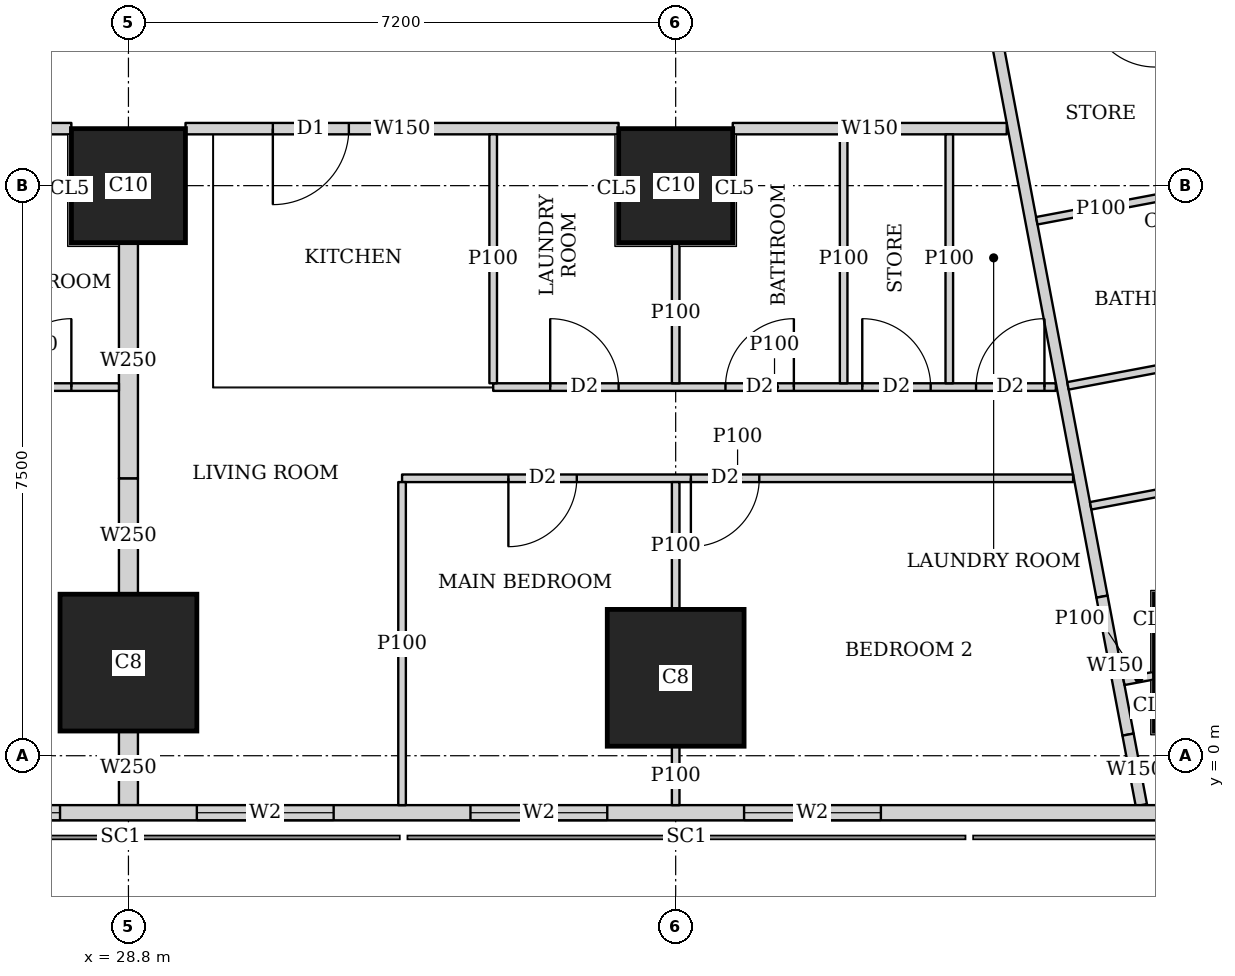
"""IFC4 building model, lengths in metres.
Left out: names, types, materials, properties, quantities, classifications, styles, units other than length and angle.
Written with IfcOpenShell. Run it as: python <this file> out.ifc"""

import sys

from ifc_helpers import new_model, si_unit, direction, frame, frame_2d, origin, origin_2d, place, context, subcontext, project, spatial, rectangle, extrude, element, fill, save


model = new_model("IFC4")
c1 = context("Model", 3, precision=1e-05, world=origin(), true_north=direction((0.0, 1.0)))
c2 = subcontext(c1, "Body", "Model", "MODEL_VIEW")
j1 = project(units=[si_unit("LENGTHUNIT", "METRE"), si_unit("PLANEANGLEUNIT", "RADIAN")], contexts=[c1])
p1 = place(None, origin())
s1 = spatial("IfcSite", under=j1, at=p1, CompositionType="ELEMENT")
p2 = place(p1, origin())
s2 = spatial("IfcBuilding", under=s1, at=p2, CompositionType="ELEMENT")
p3 = place(p2, frame((0.0, 0.0, 169.55)))
s3 = spatial("IfcBuildingStorey", under=s2, at=p3, CompositionType="ELEMENT", Elevation=169.55)
for number, where, z_axis, x_axis in (
    (1, (28.8, 1.225, 0.0), (0.0, 0.0, 1.0), (1.0, 0.0, 0.0)),
    (2, (36.0, 1.025, 0.0), (0.0, 0.0, 1.0), (1.0, 0.0, 0.0)),
    (3, (43.2, 1.225, 0.0), (0.0, 0.0, 1.0), (1.0, 0.0, 0.0)),
):
    element("IfcColumn", number, at=place(p3, frame(where, z_axis=z_axis, x_axis=x_axis)), inside=s3, PredefinedType="COLUMN", context=c2, shape_type="SweptSolid", body=[
        extrude(rectangle(XDim=1.8, YDim=1.8, at=origin_2d()), origin(), (0.0, 0.0, 1.0), 3.75),
    ])
for number, where, z_axis, x_axis in (
    (4, (28.8, 7.5, 0.0), (0.0, 0.0, 1.0), (1.0, 0.0, 0.0)),
    (5, (36.0, 7.5, 0.0), (0.0, 0.0, 1.0), (1.0, 0.0, 0.0)),
):
    element("IfcColumn", number, at=place(p3, frame(where, z_axis=z_axis, x_axis=x_axis)), inside=s3, PredefinedType="COLUMN", context=c2, shape_type="SweptSolid", body=[
        extrude(rectangle(XDim=1.5, YDim=1.5, at=origin_2d()), origin(), (0.0, 0.0, 1.0), 3.75),
    ])
p4 = place(p3, frame((2.163, -0.75, 0.0), z_axis=(0.0, 0.0, 1.0), x_axis=(1.0, 0.0, 0.0)))
e6 = element("IfcWall", 6, at=p4, inside=s3, PredefinedType="SOLIDWALL", context=c2, shape_type="SweptSolid", body=[
    extrude(rectangle(XDim=45.628, YDim=0.2, at=frame_2d((22.814, 0.0))), origin(), (0.0, 0.0, 1.0), 3.5),
])
p5 = place(p4, frame((9.537, 0.0, 0.9)))
e7 = element("IfcOpeningElement", 7, at=p5, cuts=e6, PredefinedType="OPENING", context=c2, shape_type="SweptSolid", body=[
    extrude(rectangle(XDim=1.8, YDim=1.5, at=frame_2d((0.9, 0.75))), frame((0.0, 0.11, 0.0), z_axis=(0.0, -1.0, 0.0), x_axis=(1.0, 0.0, 0.0)), (0.0, 0.0, 1.0), 0.22),
])
p6 = place(p4, frame((13.137, 0.0, 0.9)))
e8 = element("IfcOpeningElement", 8, at=p6, cuts=e6, PredefinedType="OPENING", context=c2, shape_type="SweptSolid", body=[
    extrude(rectangle(XDim=1.8, YDim=1.5, at=frame_2d((0.9, 0.75))), frame((0.0, 0.11, 0.0), z_axis=(0.0, -1.0, 0.0), x_axis=(1.0, 0.0, 0.0)), (0.0, 0.0, 1.0), 0.22),
])
p7 = place(p4, frame((16.737, 0.0, 0.9)))
e9 = element("IfcOpeningElement", 9, at=p7, cuts=e6, PredefinedType="OPENING", context=c2, shape_type="SweptSolid", body=[
    extrude(rectangle(XDim=1.8, YDim=1.5, at=frame_2d((0.9, 0.75))), frame((0.0, 0.11, 0.0), z_axis=(0.0, -1.0, 0.0), x_axis=(1.0, 0.0, 0.0)), (0.0, 0.0, 1.0), 0.22),
])
p8 = place(p4, frame((20.337, 0.0, 0.9)))
e10 = element("IfcOpeningElement", 10, at=p8, cuts=e6, PredefinedType="OPENING", context=c2, shape_type="SweptSolid", body=[
    extrude(rectangle(XDim=1.8, YDim=1.5, at=frame_2d((0.9, 0.75))), frame((0.0, 0.11, 0.0), z_axis=(0.0, -1.0, 0.0), x_axis=(1.0, 0.0, 0.0)), (0.0, 0.0, 1.0), 0.22),
])
p9 = place(p4, frame((23.937, 0.0, 0.9)))
e11 = element("IfcOpeningElement", 11, at=p9, cuts=e6, PredefinedType="OPENING", context=c2, shape_type="SweptSolid", body=[
    extrude(rectangle(XDim=1.8, YDim=1.5, at=frame_2d((0.9, 0.75))), frame((0.0, 0.11, 0.0), z_axis=(0.0, -1.0, 0.0), x_axis=(1.0, 0.0, 0.0)), (0.0, 0.0, 1.0), 0.22),
])
p10 = place(p4, frame((27.537, 0.0, 0.9)))
e12 = element("IfcOpeningElement", 12, at=p10, cuts=e6, PredefinedType="OPENING", context=c2, shape_type="SweptSolid", body=[
    extrude(rectangle(XDim=1.8, YDim=1.5, at=frame_2d((0.9, 0.75))), frame((0.0, 0.11, 0.0), z_axis=(0.0, -1.0, 0.0), x_axis=(1.0, 0.0, 0.0)), (0.0, 0.0, 1.0), 0.22),
])
p11 = place(p4, frame((31.137, 0.0, 0.9)))
e13 = element("IfcOpeningElement", 13, at=p11, cuts=e6, PredefinedType="OPENING", context=c2, shape_type="SweptSolid", body=[
    extrude(rectangle(XDim=1.8, YDim=1.5, at=frame_2d((0.9, 0.75))), frame((0.0, 0.11, 0.0), z_axis=(0.0, -1.0, 0.0), x_axis=(1.0, 0.0, 0.0)), (0.0, 0.0, 1.0), 0.22),
])
p12 = place(p4, frame((34.737, 0.0, 0.9)))
e14 = element("IfcOpeningElement", 14, at=p12, cuts=e6, PredefinedType="OPENING", context=c2, shape_type="SweptSolid", body=[
    extrude(rectangle(XDim=1.8, YDim=1.5, at=frame_2d((0.9, 0.75))), frame((0.0, 0.11, 0.0), z_axis=(0.0, -1.0, 0.0), x_axis=(1.0, 0.0, 0.0)), (0.0, 0.0, 1.0), 0.22),
])
p13 = place(p3, frame((40.356, 8.25, 0.0), z_axis=(0.0, 0.0, 1.0), x_axis=(-1.0, 0.0, 0.0)))
e15 = element("IfcWall", 15, at=p13, inside=s3, PredefinedType="SOLIDWALL", context=c2, shape_type="SweptSolid", body=[
    extrude(rectangle(XDim=3.605, YDim=0.15, at=frame_2d((1.802, 0.0))), origin(), (0.0, 0.0, 1.0), 3.5),
])
p14 = place(p3, frame((35.249, 8.25, 0.0), z_axis=(0.0, 0.0, 1.0), x_axis=(-1.0, 0.0, 0.0)))
e16 = element("IfcWall", 16, at=p14, inside=s3, PredefinedType="SOLIDWALL", context=c2, shape_type="SweptSolid", body=[
    extrude(rectangle(XDim=5.698, YDim=0.15, at=frame_2d((2.849, 0.0))), origin(), (0.0, 0.0, 1.0), 3.5),
])
p15 = place(p14, frame((3.549, 0.0, 0.0)))
e17 = element("IfcOpeningElement", 17, at=p15, cuts=e16, PredefinedType="OPENING", context=c2, shape_type="SweptSolid", body=[
    extrude(rectangle(XDim=1.0, YDim=2.1, at=frame_2d((0.5, 1.05))), frame((0.0, 0.085, 0.0), z_axis=(0.0, -1.0, 0.0), x_axis=(1.0, 0.0, 0.0)), (0.0, 0.0, 1.0), 0.17),
])
p16 = place(p3, frame((28.049, 8.25, 0.0), z_axis=(0.0, 0.0, 1.0), x_axis=(-1.0, 0.0, 0.0)))
e18 = element("IfcWall", 18, at=p16, inside=s3, PredefinedType="SOLIDWALL", context=c2, shape_type="SweptSolid", body=[
    extrude(rectangle(XDim=5.698, YDim=0.15, at=frame_2d((2.849, 0.0))), origin(), (0.0, 0.0, 1.0), 3.5),
])
p17 = place(p16, frame((3.549, 0.0, 0.0)))
e19 = element("IfcOpeningElement", 19, at=p17, cuts=e18, PredefinedType="OPENING", context=c2, shape_type="SweptSolid", body=[
    extrude(rectangle(XDim=1.0, YDim=2.1, at=frame_2d((0.5, 1.05))), frame((0.0, 0.085, 0.0), z_axis=(0.0, -1.0, 0.0), x_axis=(1.0, 0.0, 0.0)), (0.0, 0.0, 1.0), 0.17),
])
p18 = place(p3, frame((33.877, 43.029, 0.0), z_axis=(0.0, 0.0, 1.0), x_axis=(0.185596841028, -0.98262597798, 0.0)))
e20 = element("IfcWall", 20, at=p18, inside=s3, PredefinedType="SOLIDWALL", context=c2, shape_type="SweptSolid", body=[
    extrude(rectangle(XDim=41.66, YDim=0.15, at=frame_2d((20.83, 0.0))), origin(), (0.0, 0.0, 1.0), 2.5),
])
p19 = place(p18, frame((8.63, 0.0, 0.0)))
e21 = element("IfcOpeningElement", 21, at=p19, cuts=e20, PredefinedType="OPENING", context=c2, shape_type="SweptSolid", body=[
    extrude(rectangle(XDim=1.0, YDim=2.1, at=frame_2d((0.5, 1.05))), frame((0.0, 0.085, 0.0), z_axis=(0.0, -1.0, 0.0), x_axis=(1.0, 0.0, 0.0)), (0.0, 0.0, 1.0), 0.17),
])
p20 = place(p18, frame((13.841, 0.0, 0.0)))
e22 = element("IfcOpeningElement", 22, at=p20, cuts=e20, PredefinedType="OPENING", context=c2, shape_type="SweptSolid", body=[
    extrude(rectangle(XDim=1.0, YDim=2.1, at=frame_2d((0.5, 1.05))), frame((0.0, 0.085, 0.0), z_axis=(0.0, -1.0, 0.0), x_axis=(1.0, 0.0, 0.0)), (0.0, 0.0, 1.0), 0.17),
])
p21 = place(p18, frame((21.474, 0.0, 0.0)))
e23 = element("IfcOpeningElement", 23, at=p21, cuts=e20, PredefinedType="OPENING", context=c2, shape_type="SweptSolid", body=[
    extrude(rectangle(XDim=1.0, YDim=2.1, at=frame_2d((0.5, 1.05))), frame((0.0, 0.085, 0.0), z_axis=(0.0, -1.0, 0.0), x_axis=(1.0, 0.0, 0.0)), (0.0, 0.0, 1.0), 0.17),
])
p22 = place(p18, frame((30.4, 0.0, 0.0)))
e24 = element("IfcOpeningElement", 24, at=p22, cuts=e20, PredefinedType="OPENING", context=c2, shape_type="SweptSolid", body=[
    extrude(rectangle(XDim=1.0, YDim=2.1, at=frame_2d((0.5, 1.05))), frame((0.0, 0.085, 0.0), z_axis=(0.0, -1.0, 0.0), x_axis=(1.0, 0.0, 0.0)), (0.0, 0.0, 1.0), 0.17),
])
p23 = place(p18, frame((32.288, 0.0, 0.0)))
e25 = element("IfcOpeningElement", 25, at=p23, cuts=e20, PredefinedType="OPENING", context=c2, shape_type="SweptSolid", body=[
    extrude(rectangle(XDim=1.0, YDim=2.1, at=frame_2d((0.5, 1.05))), frame((0.0, 0.085, 0.0), z_axis=(0.0, -1.0, 0.0), x_axis=(1.0, 0.0, 0.0)), (0.0, 0.0, 1.0), 0.17),
])
p24 = place(p3, frame((41.609, 2.093, 0.0), z_axis=(0.0, 0.0, 1.0), x_axis=(0.185708872674, -0.982604811005, 0.0)))
e26 = element("IfcWall", 26, at=p24, inside=s3, PredefinedType="SOLIDWALL", context=c2, shape_type="SweptSolid", body=[
    extrude(rectangle(XDim=1.847, YDim=0.15, at=frame_2d((0.924, 0.0))), origin(), (0.0, 0.0, 1.0), 2.1),
])
p25 = place(p3, frame((41.952, 0.278, 0.0), z_axis=(0.0, 0.0, 1.0), x_axis=(0.185365466984, -0.982669651332, 0.0)))
e27 = element("IfcWall", 27, at=p25, inside=s3, PredefinedType="SOLIDWALL", context=c2, shape_type="SweptSolid", body=[
    extrude(rectangle(XDim=0.944, YDim=0.15, at=frame_2d((0.472, 0.0))), origin(), (0.0, 0.0, 1.0), 3.5),
])
p26 = place(p3, frame((28.675, 4.85, 0.0), z_axis=(0.0, 0.0, 1.0), x_axis=(-1.0, 0.0, 0.0)))
e28 = element("IfcWall", 28, at=p26, inside=s3, PredefinedType="PARTITIONING", context=c2, shape_type="SweptSolid", body=[
    extrude(rectangle(XDim=2.276, YDim=0.1, at=frame_2d((1.138, 0.0))), origin(), (0.0, 0.0, 1.0), 3.5),
])
p27 = place(p26, frame((0.626, 0.0, 0.0)))
e29 = element("IfcOpeningElement", 29, at=p27, cuts=e28, PredefinedType="OPENING", context=c2, shape_type="SweptSolid", body=[
    extrude(rectangle(XDim=0.9, YDim=2.1, at=frame_2d((0.45, 1.05))), frame((0.0, 0.06, 0.0), z_axis=(0.0, -1.0, 0.0), x_axis=(1.0, 0.0, 0.0)), (0.0, 0.0, 1.0), 0.12),
])
p28 = place(p3, frame((41.229, 3.65, 0.0), z_axis=(0.0, 0.0, 1.0), x_axis=(-1.0, 0.0, 0.0)))
e30 = element("IfcWall", 30, at=p28, inside=s3, PredefinedType="PARTITIONING", context=c2, shape_type="SweptSolid", body=[
    extrude(rectangle(XDim=8.829, YDim=0.1, at=frame_2d((4.415, 0.0))), origin(), (0.0, 0.0, 1.0), 3.5),
])
p29 = place(p28, frame((6.53, 0.0, 0.0)))
e31 = element("IfcOpeningElement", 31, at=p29, cuts=e30, PredefinedType="OPENING", context=c2, shape_type="SweptSolid", body=[
    extrude(rectangle(XDim=0.9, YDim=2.1, at=frame_2d((0.45, 1.05))), frame((0.0, 0.06, 0.0), z_axis=(0.0, -1.0, 0.0), x_axis=(1.0, 0.0, 0.0)), (0.0, 0.0, 1.0), 0.12),
])
p30 = place(p28, frame((4.129, 0.0, 0.0)))
e32 = element("IfcOpeningElement", 32, at=p30, cuts=e30, PredefinedType="OPENING", context=c2, shape_type="SweptSolid", body=[
    extrude(rectangle(XDim=0.9, YDim=2.1, at=frame_2d((0.45, 1.05))), frame((0.0, 0.06, 0.0), z_axis=(0.0, -1.0, 0.0), x_axis=(1.0, 0.0, 0.0)), (0.0, 0.0, 1.0), 0.12),
])
p31 = place(p3, frame((41.002, 4.85, 0.0), z_axis=(0.0, 0.0, 1.0), x_axis=(-1.0, 0.0, 0.0)))
e33 = element("IfcWall", 33, at=p31, inside=s3, PredefinedType="PARTITIONING", context=c2, shape_type="SweptSolid", body=[
    extrude(rectangle(XDim=7.403, YDim=0.1, at=frame_2d((3.701, 0.0))), origin(), (0.0, 0.0, 1.0), 3.5),
])
p32 = place(p31, frame((5.753, 0.0, 0.0)))
e34 = element("IfcOpeningElement", 34, at=p32, cuts=e33, PredefinedType="OPENING", context=c2, shape_type="SweptSolid", body=[
    extrude(rectangle(XDim=0.9, YDim=2.1, at=frame_2d((0.45, 1.05))), frame((0.0, 0.06, 0.0), z_axis=(0.0, -1.0, 0.0), x_axis=(1.0, 0.0, 0.0)), (0.0, 0.0, 1.0), 0.12),
])
p33 = place(p31, frame((3.447, 0.0, 0.0)))
e35 = element("IfcOpeningElement", 35, at=p33, cuts=e33, PredefinedType="OPENING", context=c2, shape_type="SweptSolid", body=[
    extrude(rectangle(XDim=0.9, YDim=2.1, at=frame_2d((0.45, 1.05))), frame((0.0, 0.06, 0.0), z_axis=(0.0, -1.0, 0.0), x_axis=(1.0, 0.0, 0.0)), (0.0, 0.0, 1.0), 0.12),
])
p34 = place(p31, frame((0.15, 0.0, 0.0)))
e36 = element("IfcOpeningElement", 36, at=p34, cuts=e33, PredefinedType="OPENING", context=c2, shape_type="SweptSolid", body=[
    extrude(rectangle(XDim=0.9, YDim=2.1, at=frame_2d((0.45, 1.05))), frame((0.0, 0.06, 0.0), z_axis=(0.0, -1.0, 0.0), x_axis=(1.0, 0.0, 0.0)), (0.0, 0.0, 1.0), 0.12),
])
p35 = place(p31, frame((1.647, 0.0, 0.0)))
e37 = element("IfcOpeningElement", 37, at=p35, cuts=e33, PredefinedType="OPENING", context=c2, shape_type="SweptSolid", body=[
    extrude(rectangle(XDim=0.9, YDim=2.1, at=frame_2d((0.45, 1.05))), frame((0.0, 0.06, 0.0), z_axis=(0.0, -1.0, 0.0), x_axis=(1.0, 0.0, 0.0)), (0.0, 0.0, 1.0), 0.12),
])
p36 = place(p3, frame((32.4, -0.65, 0.0), z_axis=(0.0, 0.0, 1.0), x_axis=(0.0, 1.0, 0.0)))
e38 = element("IfcWall", 38, at=p36, inside=s3, PredefinedType="PARTITIONING", context=c2, shape_type="SweptSolid", body=[
    extrude(rectangle(XDim=4.25, YDim=0.1, at=frame_2d((2.125, 0.0))), origin(), (0.0, 0.0, 1.0), 2.1),
])
p37 = place(p3, frame((36.0, -0.65, 0.0), z_axis=(0.0, 0.0, 1.0), x_axis=(0.0, 1.0, 0.0)))
e39 = element("IfcWall", 39, at=p37, inside=s3, PredefinedType="PARTITIONING", context=c2, shape_type="SweptSolid", body=[
    extrude(rectangle(XDim=0.774, YDim=0.1, at=frame_2d((0.387, 0.0))), origin(), (0.0, 0.0, 1.0), 3.5),
])
p38 = place(p3, frame((36.0, 1.926, 0.0), z_axis=(0.0, 0.0, 1.0), x_axis=(0.0, 1.0, 0.0)))
e40 = element("IfcWall", 40, at=p38, inside=s3, PredefinedType="PARTITIONING", context=c2, shape_type="SweptSolid", body=[
    extrude(rectangle(XDim=1.674, YDim=0.1, at=frame_2d((0.837, 0.0))), origin(), (0.0, 0.0, 1.0), 3.5),
])
p39 = place(p3, frame((33.599, 4.9, 0.0), z_axis=(0.0, 0.0, 1.0), x_axis=(0.0, 1.0, 0.0)))
e41 = element("IfcWall", 41, at=p39, inside=s3, PredefinedType="PARTITIONING", context=c2, shape_type="SweptSolid", body=[
    extrude(rectangle(XDim=3.275, YDim=0.1, at=frame_2d((1.638, 0.0))), origin(), (0.0, 0.0, 1.0), 3.5),
])
p40 = place(p3, frame((36.0, 4.9, 0.0), z_axis=(0.0, 0.0, 1.0), x_axis=(0.0, 1.0, 0.0)))
e42 = element("IfcWall", 42, at=p40, inside=s3, PredefinedType="PARTITIONING", context=c2, shape_type="SweptSolid", body=[
    extrude(rectangle(XDim=1.849, YDim=0.1, at=frame_2d((0.925, 0.0))), origin(), (0.0, 0.0, 1.0), 3.5),
])
for number, where, z_axis, x_axis in (
    (43, (39.6, 4.9, 0.0), (0.0, 0.0, 1.0), (0.0, 1.0, 0.0)),
    (44, (38.21, 4.9, 0.0), (0.0, 0.0, 1.0), (0.0, 1.0, 0.0)),
):
    element("IfcWall", number, at=place(p3, frame(where, z_axis=z_axis, x_axis=x_axis)), inside=s3, PredefinedType="PARTITIONING", context=c2, shape_type="SweptSolid", body=[
        extrude(rectangle(XDim=3.275, YDim=0.1, at=frame_2d((1.638, 0.0))), origin(), (0.0, 0.0, 1.0), 3.5),
    ])
p41 = place(p3, frame((28.8, -0.65, 0.0), z_axis=(0.0, 0.0, 1.0), x_axis=(0.0, 1.0, 0.0)))
e45 = element("IfcWall", 45, at=p41, inside=s3, PredefinedType="SOLIDWALL", context=c2, shape_type="SweptSolid", body=[
    extrude(rectangle(XDim=0.974, YDim=0.25, at=frame_2d((0.487, 0.0))), origin(), (0.0, 0.0, 1.0), 2.1),
])
p42 = place(p3, frame((28.8, 2.126, 0.0), z_axis=(0.0, 0.0, 1.0), x_axis=(0.0, 1.0, 0.0)))
e46 = element("IfcWall", 46, at=p42, inside=s3, PredefinedType="SOLIDWALL", context=c2, shape_type="SweptSolid", body=[
    extrude(rectangle(XDim=1.524, YDim=0.25, at=frame_2d((0.762, 0.0))), origin(), (0.0, 0.0, 1.0), 2.1),
])
p43 = place(p3, frame((28.8, 3.65, 0.0), z_axis=(0.0, 0.0, 1.0), x_axis=(0.0, 1.0, 0.0)))
e47 = element("IfcWall", 47, at=p43, inside=s3, PredefinedType="SOLIDWALL", context=c2, shape_type="SweptSolid", body=[
    extrude(rectangle(XDim=3.099, YDim=0.25, at=frame_2d((1.55, 0.0))), origin(), (0.0, 0.0, 1.0), 3.5),
])
p44 = place(p3, frame((42.44, 7.357, 0.0), z_axis=(0.0, 0.0, 1.0), x_axis=(-0.982643094077, -0.185506198448, 0.0)))
e48 = element("IfcWall", 48, at=p44, inside=s3, PredefinedType="PARTITIONING", context=c2, shape_type="SweptSolid", body=[
    extrude(rectangle(XDim=1.719, YDim=0.1, at=frame_2d((0.859, 0.0))), origin(), (0.0, 0.0, 1.0), 3.5),
])
p45 = place(p3, frame((42.29, 1.053, 0.0), z_axis=(0.0, 0.0, 1.0), x_axis=(-0.982830800147, -0.184509127909, 0.0)))
e49 = element("IfcWall", 49, at=p45, inside=s3, PredefinedType="PARTITIONING", context=c2, shape_type="SweptSolid", body=[
    extrude(rectangle(XDim=0.401, YDim=0.1, at=frame_2d((0.2, 0.0))), origin(), (0.0, 0.0, 1.0), 2.1),
])
p46 = place(p3, frame((44.677, 3.896, 0.0), z_axis=(0.0, 0.0, 1.0), x_axis=(-0.982610347627, -0.185679575441, 0.0)))
e50 = element("IfcWall", 50, at=p46, inside=s3, PredefinedType="PARTITIONING", context=c2, shape_type="SweptSolid", body=[
    extrude(rectangle(XDim=3.274, YDim=0.1, at=frame_2d((1.637, 0.0))), origin(), (0.0, 0.0, 1.0), 3.5),
])
p47 = place(p3, frame((44.379, 5.474, 0.0), z_axis=(0.0, 0.0, 1.0), x_axis=(-0.982607026909, -0.185697147715, 0.0)))
e51 = element("IfcWall", 51, at=p47, inside=s3, PredefinedType="PARTITIONING", context=c2, shape_type="SweptSolid", body=[
    extrude(rectangle(XDim=3.275, YDim=0.1, at=frame_2d((1.637, 0.0))), origin(), (0.0, 0.0, 1.0), 3.5),
])
p48 = place(p9, origin())
e52 = element("IfcWindow", 52, at=p48, inside=s3, PartitioningType="SINGLE_PANEL", PredefinedType="WINDOW", context=c2, shape_type="SweptSolid", body=[
    extrude(rectangle(XDim=1.8, YDim=1.5, at=frame_2d((0.9, 0.75))), frame((0.0, 0.03, 0.0), z_axis=(0.0, -1.0, 0.0), x_axis=(1.0, 0.0, 0.0)), (0.0, 0.0, 1.0), 0.06),
])
fill(e11, e52)
p49 = place(p10, origin())
e53 = element("IfcWindow", 53, at=p49, inside=s3, PartitioningType="SINGLE_PANEL", PredefinedType="WINDOW", context=c2, shape_type="SweptSolid", body=[
    extrude(rectangle(XDim=1.8, YDim=1.5, at=frame_2d((0.9, 0.75))), frame((0.0, 0.03, 0.0), z_axis=(0.0, -1.0, 0.0), x_axis=(1.0, 0.0, 0.0)), (0.0, 0.0, 1.0), 0.06),
])
fill(e12, e53)
p50 = place(p11, origin())
e54 = element("IfcWindow", 54, at=p50, inside=s3, PartitioningType="SINGLE_PANEL", PredefinedType="WINDOW", context=c2, shape_type="SweptSolid", body=[
    extrude(rectangle(XDim=1.8, YDim=1.5, at=frame_2d((0.9, 0.75))), frame((0.0, 0.03, 0.0), z_axis=(0.0, -1.0, 0.0), x_axis=(1.0, 0.0, 0.0)), (0.0, 0.0, 1.0), 0.06),
])
fill(e13, e54)
p51 = place(p12, origin())
e55 = element("IfcWindow", 55, at=p51, inside=s3, PartitioningType="SINGLE_PANEL", PredefinedType="WINDOW", context=c2, shape_type="SweptSolid", body=[
    extrude(rectangle(XDim=1.8, YDim=1.5, at=frame_2d((0.9, 0.75))), frame((0.0, 0.03, 0.0), z_axis=(0.0, -1.0, 0.0), x_axis=(1.0, 0.0, 0.0)), (0.0, 0.0, 1.0), 0.06),
])
fill(e14, e55)
p52 = place(p27, origin())
e56 = element("IfcDoor", 56, at=p52, inside=s3, OperationType="SINGLE_SWING_RIGHT", PredefinedType="DOOR", context=c2, shape_type="SweptSolid", body=[
    extrude(rectangle(XDim=0.9, YDim=2.1, at=frame_2d((0.45, 1.05))), frame((0.0, 0.025, 0.0), z_axis=(0.0, -1.0, 0.0), x_axis=(1.0, 0.0, 0.0)), (0.0, 0.0, 1.0), 0.05),
])
fill(e29, e56)
p53 = place(p29, origin())
e57 = element("IfcDoor", 57, at=p53, inside=s3, OperationType="SINGLE_SWING_RIGHT", PredefinedType="DOOR", context=c2, shape_type="SweptSolid", body=[
    extrude(rectangle(XDim=0.9, YDim=2.1, at=frame_2d((0.45, 1.05))), frame((0.0, 0.025, 0.0), z_axis=(0.0, -1.0, 0.0), x_axis=(1.0, 0.0, 0.0)), (0.0, 0.0, 1.0), 0.05),
])
fill(e31, e57)
p54 = place(p30, origin())
e58 = element("IfcDoor", 58, at=p54, inside=s3, OperationType="SINGLE_SWING_RIGHT", PredefinedType="DOOR", context=c2, shape_type="SweptSolid", body=[
    extrude(rectangle(XDim=0.9, YDim=2.1, at=frame_2d((0.45, 1.05))), frame((0.0, 0.025, 0.0), z_axis=(0.0, -1.0, 0.0), x_axis=(1.0, 0.0, 0.0)), (0.0, 0.0, 1.0), 0.05),
])
fill(e32, e58)
p55 = place(p32, origin())
e59 = element("IfcDoor", 59, at=p55, inside=s3, OperationType="SINGLE_SWING_LEFT", PredefinedType="DOOR", context=c2, shape_type="SweptSolid", body=[
    extrude(rectangle(XDim=0.9, YDim=2.1, at=frame_2d((0.45, 1.05))), frame((0.0, 0.025, 0.0), z_axis=(0.0, -1.0, 0.0), x_axis=(1.0, 0.0, 0.0)), (0.0, 0.0, 1.0), 0.05),
])
fill(e34, e59)
p56 = place(p33, origin())
e60 = element("IfcDoor", 60, at=p56, inside=s3, OperationType="SINGLE_SWING_RIGHT", PredefinedType="DOOR", context=c2, shape_type="SweptSolid", body=[
    extrude(rectangle(XDim=0.9, YDim=2.1, at=frame_2d((0.45, 1.05))), frame((0.0, 0.025, 0.0), z_axis=(0.0, -1.0, 0.0), x_axis=(1.0, 0.0, 0.0)), (0.0, 0.0, 1.0), 0.05),
])
fill(e35, e60)
p57 = place(p34, origin())
e61 = element("IfcDoor", 61, at=p57, inside=s3, OperationType="SINGLE_SWING_RIGHT", PredefinedType="DOOR", context=c2, shape_type="SweptSolid", body=[
    extrude(rectangle(XDim=0.9, YDim=2.1, at=frame_2d((0.45, 1.05))), frame((0.0, 0.025, 0.0), z_axis=(0.0, -1.0, 0.0), x_axis=(1.0, 0.0, 0.0)), (0.0, 0.0, 1.0), 0.05),
])
fill(e36, e61)
p58 = place(p35, origin())
e62 = element("IfcDoor", 62, at=p58, inside=s3, OperationType="SINGLE_SWING_LEFT", PredefinedType="DOOR", context=c2, shape_type="SweptSolid", body=[
    extrude(rectangle(XDim=0.9, YDim=2.1, at=frame_2d((0.45, 1.05))), frame((0.0, 0.025, 0.0), z_axis=(0.0, -1.0, 0.0), x_axis=(1.0, 0.0, 0.0)), (0.0, 0.0, 1.0), 0.05),
])
fill(e37, e62)
p59 = place(p15, origin())
e63 = element("IfcDoor", 63, at=p59, inside=s3, OperationType="SINGLE_SWING_RIGHT", PredefinedType="DOOR", context=c2, shape_type="SweptSolid", body=[
    extrude(rectangle(XDim=1.0, YDim=2.1, at=frame_2d((0.5, 1.05))), frame((0.0, 0.025, 0.0), z_axis=(0.0, -1.0, 0.0), x_axis=(1.0, 0.0, 0.0)), (0.0, 0.0, 1.0), 0.05),
])
fill(e17, e63)
save(model, sys.argv[1])
